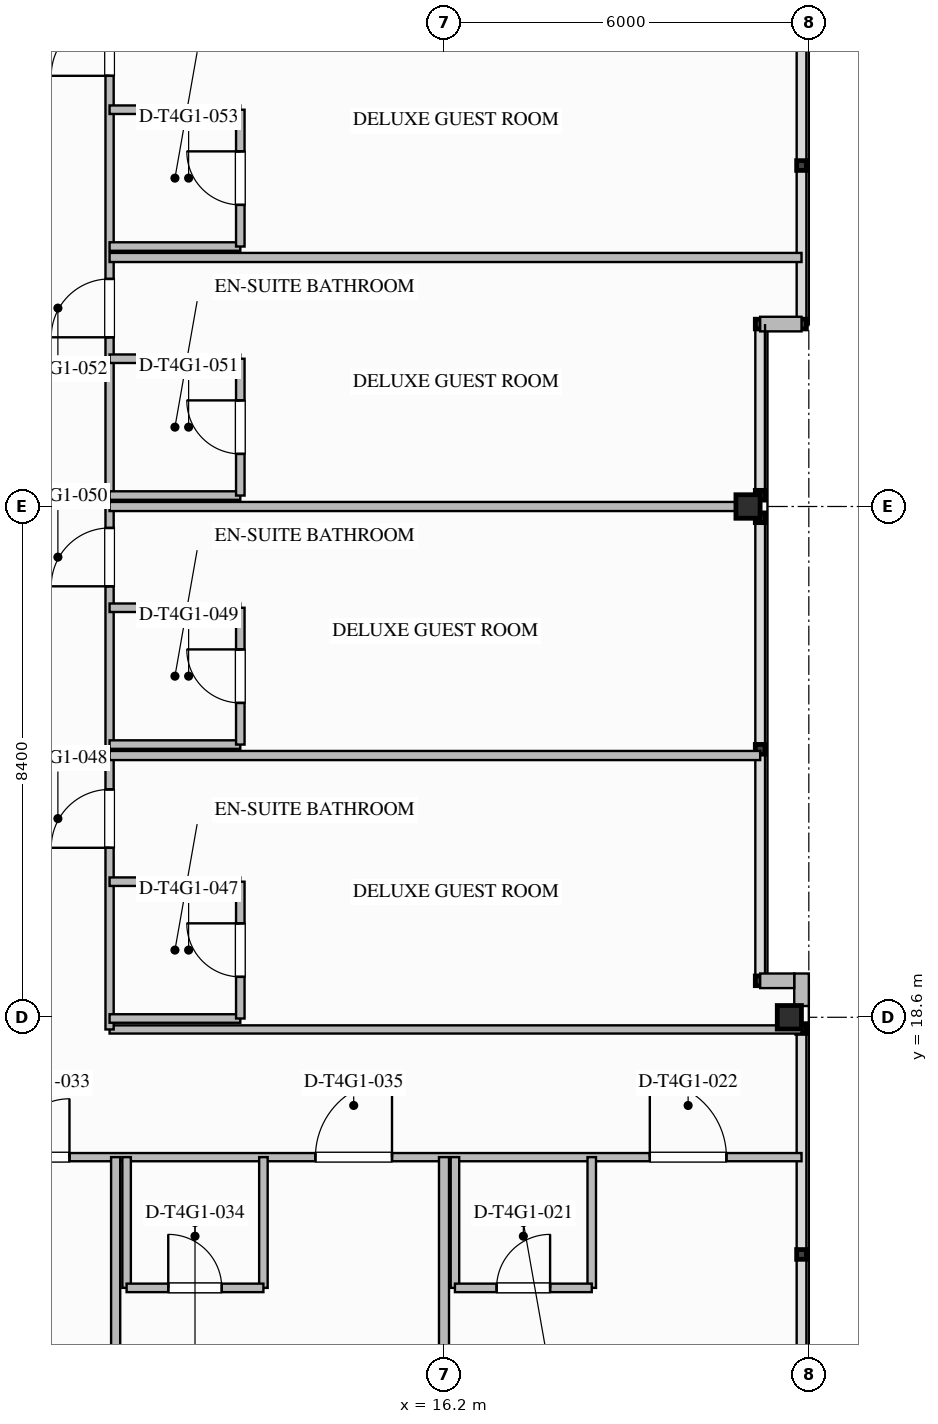
"""IFC4 building model, lengths in metres.
Left out: names, types, materials, properties, quantities, classifications, styles, units other than length and angle.
Written with IfcOpenShell. Run it as: python <this file> out.ifc"""

import sys

from ifc_helpers import new_model, si_unit, direction, frame, frame_2d, origin, origin_2d, place, context, subcontext, project, spatial, rectangle, i_section, extrude, element, fill, save


model = new_model("IFC4")
c1 = context("Model", 3, precision=1e-05, world=origin(), true_north=direction((0.0, 1.0)))
c2 = subcontext(c1, "Body", "Model", "MODEL_VIEW")
j1 = project(units=[si_unit("LENGTHUNIT", "METRE"), si_unit("PLANEANGLEUNIT", "RADIAN")], contexts=[c1])
p1 = place(None, origin())
s1 = spatial("IfcSite", under=j1, at=p1, CompositionType="ELEMENT")
p2 = place(p1, origin())
s2 = spatial("IfcBuilding", under=s1, at=p2, CompositionType="ELEMENT")
p3 = place(p2, frame((0.0, 0.0, 205.1)))
s3 = spatial("IfcBuildingStorey", under=s2, at=p3, CompositionType="ELEMENT", Elevation=205.1)
for number, where, z_axis, x_axis in (
    (1, (21.88, 18.6, 0.0), (0.0, 0.0, 1.0), (1.0, 0.0, 0.0)),
    (2, (21.2, 27.0, 0.0), (0.0, 0.0, 1.0), (1.0, 0.0, 0.0)),
):
    element("IfcColumn", number, at=place(p3, frame(where, z_axis=z_axis, x_axis=x_axis)), inside=s3, PredefinedType="COLUMN", context=c2, shape_type="SweptSolid", body=[
        extrude(i_section(OverallWidth=0.397, OverallDepth=0.387, WebThickness=0.021, FlangeThickness=0.033, FilletRadius=0.025, at=origin_2d()), origin(), (0.0, 0.0, 1.0), 3.597),
    ])
p4 = place(p3, frame((22.08, 19.32, 0.0), z_axis=(0.0, 0.0, 1.0), x_axis=(0.0, -1.0, 0.0)))
e3 = element("IfcWall", 3, at=p4, inside=s3, PredefinedType="STANDARD", context=c2, shape_type="SweptSolid", body=[
    extrude(rectangle(XDim=0.535, YDim=0.24, at=frame_2d((0.267, 0.0))), origin(), (0.0, 0.0, 1.0), 3.34),
])
p5 = place(p3, frame((22.08, 30.0, 0.0), z_axis=(0.0, 0.0, 1.0), x_axis=(-1.0, 0.0, 0.0)))
e4 = element("IfcWall", 4, at=p5, inside=s3, PredefinedType="STANDARD", context=c2, shape_type="SweptSolid", body=[
    extrude(rectangle(XDim=0.68, YDim=0.24, at=frame_2d((0.34, 0.0))), origin(), (0.0, 0.0, 1.0), 3.34),
])
p6 = place(p3, frame((21.4, 19.2, 0.0), z_axis=(0.0, 0.0, 1.0), x_axis=(1.0, 0.0, 0.0)))
e5 = element("IfcWall", 5, at=p6, inside=s3, PredefinedType="STANDARD", context=c2, shape_type="SweptSolid", body=[
    extrude(rectangle(XDim=0.56, YDim=0.24, at=frame_2d((0.28, 0.0))), origin(), (0.0, 0.0, 1.0), 3.34),
])
p7 = place(p3, frame((-16.2, 16.3, 0.0), z_axis=(0.0, 0.0, 1.0), x_axis=(1.0, 0.0, 0.0)))
e6 = element("IfcWall", 6, at=p7, inside=s3, PredefinedType="PARTITIONING", context=c2, shape_type="SweptSolid", body=[
    extrude(rectangle(XDim=38.28, YDim=0.135, at=frame_2d((19.14, 0.0))), origin(), (0.0, 0.0, 1.0), 3.34),
])
p8 = place(p7, frame((35.785, 0.0, 0.0)))
e7 = element("IfcOpeningElement", 7, at=p8, cuts=e6, PredefinedType="OPENING", context=c2, shape_type="SweptSolid", body=[
    extrude(rectangle(XDim=1.26, YDim=2.2, at=frame_2d((0.63, 1.1))), frame((0.0, 0.077, 0.0), z_axis=(0.0, -1.0, 0.0), x_axis=(1.0, 0.0, 0.0)), (0.0, 0.0, 1.0), 0.155),
])
p9 = place(p7, frame((3.285, 0.0, 0.0)))
e8 = element("IfcOpeningElement", 8, at=p9, cuts=e6, PredefinedType="OPENING", context=c2, shape_type="SweptSolid", body=[
    extrude(rectangle(XDim=1.26, YDim=2.2, at=frame_2d((0.63, 1.1))), frame((0.0, 0.077, 0.0), z_axis=(0.0, -1.0, 0.0), x_axis=(1.0, 0.0, 0.0)), (0.0, 0.0, 1.0), 0.155),
])
p10 = place(p7, frame((8.59, 0.0, 0.0)))
e9 = element("IfcOpeningElement", 9, at=p10, cuts=e6, PredefinedType="OPENING", context=c2, shape_type="SweptSolid", body=[
    extrude(rectangle(XDim=0.96, YDim=2.15, at=frame_2d((0.48, 1.075))), frame((0.0, 0.077, 0.0), z_axis=(0.0, -1.0, 0.0), x_axis=(1.0, 0.0, 0.0)), (0.0, 0.0, 1.0), 0.155),
])
p11 = place(p7, frame((12.744, 0.0, 0.0)))
e10 = element("IfcOpeningElement", 10, at=p11, cuts=e6, PredefinedType="OPENING", context=c2, shape_type="SweptSolid", body=[
    extrude(rectangle(XDim=1.02, YDim=2.15, at=frame_2d((0.51, 1.075))), frame((0.0, 0.077, 0.0), z_axis=(0.0, -1.0, 0.0), x_axis=(1.0, 0.0, 0.0)), (0.0, 0.0, 1.0), 0.155),
])
p12 = place(p7, frame((19.73, 0.0, 0.0)))
e11 = element("IfcOpeningElement", 11, at=p12, cuts=e6, PredefinedType="OPENING", context=c2, shape_type="SweptSolid", body=[
    extrude(rectangle(XDim=1.26, YDim=2.2, at=frame_2d((0.63, 1.1))), frame((0.0, 0.077, 0.0), z_axis=(0.0, -1.0, 0.0), x_axis=(1.0, 0.0, 0.0)), (0.0, 0.0, 1.0), 0.155),
])
p13 = place(p7, frame((25.281, 0.0, 0.0)))
e12 = element("IfcOpeningElement", 12, at=p13, cuts=e6, PredefinedType="OPENING", context=c2, shape_type="SweptSolid", body=[
    extrude(rectangle(XDim=0.96, YDim=2.15, at=frame_2d((0.48, 1.075))), frame((0.0, 0.077, 0.0), z_axis=(0.0, -1.0, 0.0), x_axis=(1.0, 0.0, 0.0)), (0.0, 0.0, 1.0), 0.155),
])
p14 = place(p7, frame((30.285, 0.0, 0.0)))
e13 = element("IfcOpeningElement", 13, at=p14, cuts=e6, PredefinedType="OPENING", context=c2, shape_type="SweptSolid", body=[
    extrude(rectangle(XDim=1.26, YDim=2.2, at=frame_2d((0.63, 1.1))), frame((0.0, 0.077, 0.0), z_axis=(0.0, -1.0, 0.0), x_axis=(1.0, 0.0, 0.0)), (0.0, 0.0, 1.0), 0.155),
])
p15 = place(p3, frame((10.7, 18.4, 0.0), z_axis=(0.0, 0.0, 1.0), x_axis=(1.0, 0.0, 0.0)))
e14 = element("IfcWall", 14, at=p15, inside=s3, PredefinedType="PARTITIONING", context=c2, shape_type="SweptSolid", body=[
    extrude(rectangle(XDim=11.38, YDim=0.135, at=frame_2d((5.69, 0.0))), origin(), (0.0, 0.0, 1.0), 2.717),
])
p16 = place(p3, frame((10.7, 18.4, 0.0), z_axis=(0.0, 0.0, 1.0), x_axis=(0.0, 1.0, 0.0)))
e15 = element("IfcWall", 15, at=p16, inside=s3, PredefinedType="PARTITIONING", context=c2, shape_type="SweptSolid", body=[
    extrude(rectangle(XDim=17.2, YDim=0.135, at=frame_2d((8.6, 0.0))), origin(), (0.0, 0.0, 1.0), 3.34),
])
p17 = place(p16, frame((2.987, 0.0, 0.0)))
e16 = element("IfcOpeningElement", 16, at=p17, cuts=e15, PredefinedType="OPENING", context=c2, shape_type="SweptSolid", body=[
    extrude(rectangle(XDim=0.96, YDim=2.15, at=frame_2d((0.48, 1.075))), frame((0.0, 0.077, 0.0), z_axis=(0.0, -1.0, 0.0), x_axis=(1.0, 0.0, 0.0)), (0.0, 0.0, 1.0), 0.155),
])
p18 = place(p16, frame((7.287, 0.0, 0.0)))
e17 = element("IfcOpeningElement", 17, at=p18, cuts=e15, PredefinedType="OPENING", context=c2, shape_type="SweptSolid", body=[
    extrude(rectangle(XDim=0.96, YDim=2.15, at=frame_2d((0.48, 1.075))), frame((0.0, 0.077, 0.0), z_axis=(0.0, -1.0, 0.0), x_axis=(1.0, 0.0, 0.0)), (0.0, 0.0, 1.0), 0.155),
])
p19 = place(p16, frame((11.383, 0.0, 0.0)))
e18 = element("IfcOpeningElement", 18, at=p19, cuts=e15, PredefinedType="OPENING", context=c2, shape_type="SweptSolid", body=[
    extrude(rectangle(XDim=0.96, YDim=2.15, at=frame_2d((0.48, 1.075))), frame((0.0, 0.077, 0.0), z_axis=(0.0, -1.0, 0.0), x_axis=(1.0, 0.0, 0.0)), (0.0, 0.0, 1.0), 0.155),
])
p20 = place(p16, frame((15.683, 0.0, 0.0)))
e19 = element("IfcOpeningElement", 19, at=p20, cuts=e15, PredefinedType="OPENING", context=c2, shape_type="SweptSolid", body=[
    extrude(rectangle(XDim=0.96, YDim=2.15, at=frame_2d((0.48, 1.075))), frame((0.0, 0.077, 0.0), z_axis=(0.0, -1.0, 0.0), x_axis=(1.0, 0.0, 0.0)), (0.0, 0.0, 1.0), 0.155),
])
p21 = place(p3, frame((16.2, 0.12, 0.0), z_axis=(0.0, 0.0, 1.0), x_axis=(0.0, 1.0, 0.0)))
e20 = element("IfcWall", 20, at=p21, inside=s3, PredefinedType="PARTITIONING", context=c2, shape_type="SweptSolid", body=[
    extrude(rectangle(XDim=16.18, YDim=0.165, at=frame_2d((8.09, 0.0))), origin(), (0.0, 0.0, 1.0), 2.714),
])
p22 = place(p3, frame((16.38, 16.3, 0.0), z_axis=(0.0, 0.0, 1.0), x_axis=(0.0, -1.0, 0.0)))
e21 = element("IfcWall", 21, at=p22, inside=s3, PredefinedType="PLUMBINGWALL", context=c2, shape_type="SweptSolid", body=[
    extrude(rectangle(XDim=2.15, YDim=0.14, at=frame_2d((1.075, 0.0))), origin(), (0.0, 0.0, 1.0), 2.714),
])
p23 = place(p3, frame((18.63, 16.3, 0.0), z_axis=(0.0, 0.0, 1.0), x_axis=(0.0, -1.0, 0.0)))
e22 = element("IfcWall", 22, at=p23, inside=s3, PredefinedType="PLUMBINGWALL", context=c2, shape_type="SweptSolid", body=[
    extrude(rectangle(XDim=2.15, YDim=0.14, at=frame_2d((1.075, 0.0))), origin(), (0.0, 0.0, 1.0), 3.34),
])
p24 = place(p3, frame((16.38, 14.15, 0.0), z_axis=(0.0, 0.0, 1.0), x_axis=(1.0, 0.0, 0.0)))
e23 = element("IfcWall", 23, at=p24, inside=s3, PredefinedType="PLUMBINGWALL", context=c2, shape_type="SweptSolid", body=[
    extrude(rectangle(XDim=2.25, YDim=0.14, at=frame_2d((1.125, 0.0))), origin(), (0.0, 0.0, 1.0), 3.34),
])
p25 = place(p24, frame((0.685, 0.0, 0.0)))
e24 = element("IfcOpeningElement", 24, at=p25, cuts=e23, PredefinedType="OPENING", context=c2, shape_type="SweptSolid", body=[
    extrude(rectangle(XDim=0.88, YDim=2.1, at=frame_2d((0.44, 1.05))), frame((0.0, 0.08, 0.0), z_axis=(0.0, -1.0, 0.0), x_axis=(1.0, 0.0, 0.0)), (0.0, 0.0, 1.0), 0.16),
])
p26 = place(p3, frame((10.8, 0.12, 0.0), z_axis=(0.0, 0.0, 1.0), x_axis=(0.0, 1.0, 0.0)))
e25 = element("IfcWall", 25, at=p26, inside=s3, PredefinedType="PARTITIONING", context=c2, shape_type="SweptSolid", body=[
    extrude(rectangle(XDim=16.18, YDim=0.15, at=frame_2d((8.09, 0.0))), origin(), (0.0, 0.0, 1.0), 3.34),
])
for number, where, z_axis, x_axis in (
    (26, (10.98, 16.3, 0.0), (0.0, 0.0, 1.0), (0.0, -1.0, 0.0)),
    (27, (13.23, 16.3, 0.0), (0.0, 0.0, 1.0), (0.0, -1.0, 0.0)),
):
    element("IfcWall", number, at=place(p3, frame(where, z_axis=z_axis, x_axis=x_axis)), inside=s3, PredefinedType="PLUMBINGWALL", context=c2, shape_type="SweptSolid", body=[
        extrude(rectangle(XDim=2.15, YDim=0.14, at=frame_2d((1.075, 0.0))), origin(), (0.0, 0.0, 1.0), 3.34),
    ])
p27 = place(p3, frame((10.98, 14.15, 0.0), z_axis=(0.0, 0.0, 1.0), x_axis=(1.0, 0.0, 0.0)))
e28 = element("IfcWall", 28, at=p27, inside=s3, PredefinedType="PLUMBINGWALL", context=c2, shape_type="SweptSolid", body=[
    extrude(rectangle(XDim=2.25, YDim=0.14, at=frame_2d((1.125, 0.0))), origin(), (0.0, 0.0, 1.0), 3.34),
])
p28 = place(p27, frame((0.685, 0.0, 0.0)))
e29 = element("IfcOpeningElement", 29, at=p28, cuts=e28, PredefinedType="OPENING", context=c2, shape_type="SweptSolid", body=[
    extrude(rectangle(XDim=0.88, YDim=2.1, at=frame_2d((0.44, 1.05))), frame((0.0, 0.08, 0.0), z_axis=(0.0, -1.0, 0.0), x_axis=(1.0, 0.0, 0.0)), (0.0, 0.0, 1.0), 0.16),
])
p29 = place(p3, frame((10.7, 18.58, 0.0), z_axis=(0.0, 0.0, 1.0), x_axis=(1.0, 0.0, 0.0)))
e30 = element("IfcWall", 30, at=p29, inside=s3, PredefinedType="PLUMBINGWALL", context=c2, shape_type="SweptSolid", body=[
    extrude(rectangle(XDim=2.15, YDim=0.14, at=frame_2d((1.075, 0.0))), origin(), (0.0, 0.0, 1.0), 2.717),
])
p30 = place(p3, frame((10.7, 20.83, 0.0), z_axis=(0.0, 0.0, 1.0), x_axis=(1.0, 0.0, 0.0)))
e31 = element("IfcWall", 31, at=p30, inside=s3, PredefinedType="PLUMBINGWALL", context=c2, shape_type="SweptSolid", body=[
    extrude(rectangle(XDim=2.15, YDim=0.14, at=frame_2d((1.075, 0.0))), origin(), (0.0, 0.0, 1.0), 3.34),
])
p31 = place(p3, frame((12.85, 18.58, 0.0), z_axis=(0.0, 0.0, 1.0), x_axis=(0.0, 1.0, 0.0)))
e32 = element("IfcWall", 32, at=p31, inside=s3, PredefinedType="PLUMBINGWALL", context=c2, shape_type="SweptSolid", body=[
    extrude(rectangle(XDim=2.25, YDim=0.14, at=frame_2d((1.125, 0.0))), origin(), (0.0, 0.0, 1.0), 3.34),
])
p32 = place(p31, frame((0.685, 0.0, 0.0)))
e33 = element("IfcOpeningElement", 33, at=p32, cuts=e32, PredefinedType="OPENING", context=c2, shape_type="SweptSolid", body=[
    extrude(rectangle(XDim=0.88, YDim=2.1, at=frame_2d((0.44, 1.05))), frame((0.0, 0.08, 0.0), z_axis=(0.0, -1.0, 0.0), x_axis=(1.0, 0.0, 0.0)), (0.0, 0.0, 1.0), 0.16),
])
p33 = place(p3, frame((10.7, 22.905, 0.0), z_axis=(0.0, 0.0, 1.0), x_axis=(1.0, 0.0, 0.0)))
e34 = element("IfcWall", 34, at=p33, inside=s3, PredefinedType="PARTITIONING", context=c2, shape_type="SweptSolid", body=[
    extrude(rectangle(XDim=10.7, YDim=0.15, at=frame_2d((5.35, 0.0))), origin(), (0.0, 0.0, 1.0), 3.34),
])
for number, where, z_axis, x_axis in (
    (35, (10.7, 23.085, 0.0), (0.0, 0.0, 1.0), (1.0, 0.0, 0.0)),
    (36, (10.7, 25.335, 0.0), (0.0, 0.0, 1.0), (1.0, 0.0, 0.0)),
):
    element("IfcWall", number, at=place(p3, frame(where, z_axis=z_axis, x_axis=x_axis)), inside=s3, PredefinedType="PLUMBINGWALL", context=c2, shape_type="SweptSolid", body=[
        extrude(rectangle(XDim=2.15, YDim=0.14, at=frame_2d((1.075, 0.0))), origin(), (0.0, 0.0, 1.0), 3.34),
    ])
p34 = place(p3, frame((12.85, 23.085, 0.0), z_axis=(0.0, 0.0, 1.0), x_axis=(0.0, 1.0, 0.0)))
e37 = element("IfcWall", 37, at=p34, inside=s3, PredefinedType="PLUMBINGWALL", context=c2, shape_type="SweptSolid", body=[
    extrude(rectangle(XDim=2.25, YDim=0.14, at=frame_2d((1.125, 0.0))), origin(), (0.0, 0.0, 1.0), 3.34),
])
p35 = place(p34, frame((0.685, 0.0, 0.0)))
e38 = element("IfcOpeningElement", 38, at=p35, cuts=e37, PredefinedType="OPENING", context=c2, shape_type="SweptSolid", body=[
    extrude(rectangle(XDim=0.88, YDim=2.1, at=frame_2d((0.44, 1.05))), frame((0.0, 0.08, 0.0), z_axis=(0.0, -1.0, 0.0), x_axis=(1.0, 0.0, 0.0)), (0.0, 0.0, 1.0), 0.16),
])
p36 = place(p3, frame((10.7, 27.0, 0.0), z_axis=(0.0, 0.0, 1.0), x_axis=(1.0, 0.0, 0.0)))
e39 = element("IfcWall", 39, at=p36, inside=s3, PredefinedType="PARTITIONING", context=c2, shape_type="SweptSolid", body=[
    extrude(rectangle(XDim=10.7, YDim=0.15, at=frame_2d((5.35, 0.0))), origin(), (0.0, 0.0, 1.0), 2.717),
])
p37 = place(p3, frame((10.7, 27.18, 0.0), z_axis=(0.0, 0.0, 1.0), x_axis=(1.0, 0.0, 0.0)))
e40 = element("IfcWall", 40, at=p37, inside=s3, PredefinedType="PLUMBINGWALL", context=c2, shape_type="SweptSolid", body=[
    extrude(rectangle(XDim=2.15, YDim=0.14, at=frame_2d((1.075, 0.0))), origin(), (0.0, 0.0, 1.0), 2.717),
])
p38 = place(p3, frame((10.7, 29.43, 0.0), z_axis=(0.0, 0.0, 1.0), x_axis=(1.0, 0.0, 0.0)))
e41 = element("IfcWall", 41, at=p38, inside=s3, PredefinedType="PLUMBINGWALL", context=c2, shape_type="SweptSolid", body=[
    extrude(rectangle(XDim=2.15, YDim=0.14, at=frame_2d((1.075, 0.0))), origin(), (0.0, 0.0, 1.0), 3.34),
])
p39 = place(p3, frame((12.85, 27.18, 0.0), z_axis=(0.0, 0.0, 1.0), x_axis=(0.0, 1.0, 0.0)))
e42 = element("IfcWall", 42, at=p39, inside=s3, PredefinedType="PLUMBINGWALL", context=c2, shape_type="SweptSolid", body=[
    extrude(rectangle(XDim=2.25, YDim=0.14, at=frame_2d((1.125, 0.0))), origin(), (0.0, 0.0, 1.0), 3.34),
])
p40 = place(p39, frame((0.685, 0.0, 0.0)))
e43 = element("IfcOpeningElement", 43, at=p40, cuts=e42, PredefinedType="OPENING", context=c2, shape_type="SweptSolid", body=[
    extrude(rectangle(XDim=0.88, YDim=2.1, at=frame_2d((0.44, 1.05))), frame((0.0, 0.08, 0.0), z_axis=(0.0, -1.0, 0.0), x_axis=(1.0, 0.0, 0.0)), (0.0, 0.0, 1.0), 0.16),
])
p41 = place(p3, frame((10.7, 31.095, 0.0), z_axis=(0.0, 0.0, 1.0), x_axis=(1.0, 0.0, 0.0)))
e44 = element("IfcWall", 44, at=p41, inside=s3, PredefinedType="PARTITIONING", context=c2, shape_type="SweptSolid", body=[
    extrude(rectangle(XDim=11.38, YDim=0.15, at=frame_2d((5.69, 0.0))), origin(), (0.0, 0.0, 1.0), 3.34),
])
for number, where, z_axis, x_axis in (
    (45, (10.7, 31.275, 0.0), (0.0, 0.0, 1.0), (1.0, 0.0, 0.0)),
    (46, (10.7, 33.525, 0.0), (0.0, 0.0, 1.0), (1.0, 0.0, 0.0)),
):
    element("IfcWall", number, at=place(p3, frame(where, z_axis=z_axis, x_axis=x_axis)), inside=s3, PredefinedType="PLUMBINGWALL", context=c2, shape_type="SweptSolid", body=[
        extrude(rectangle(XDim=2.15, YDim=0.14, at=frame_2d((1.075, 0.0))), origin(), (0.0, 0.0, 1.0), 3.34),
    ])
p42 = place(p3, frame((12.85, 31.275, 0.0), z_axis=(0.0, 0.0, 1.0), x_axis=(0.0, 1.0, 0.0)))
e47 = element("IfcWall", 47, at=p42, inside=s3, PredefinedType="PLUMBINGWALL", context=c2, shape_type="SweptSolid", body=[
    extrude(rectangle(XDim=2.25, YDim=0.14, at=frame_2d((1.125, 0.0))), origin(), (0.0, 0.0, 1.0), 3.34),
])
p43 = place(p42, frame((0.685, 0.0, 0.0)))
e48 = element("IfcOpeningElement", 48, at=p43, cuts=e47, PredefinedType="OPENING", context=c2, shape_type="SweptSolid", body=[
    extrude(rectangle(XDim=0.88, YDim=2.1, at=frame_2d((0.44, 1.05))), frame((0.0, 0.08, 0.0), z_axis=(0.0, -1.0, 0.0), x_axis=(1.0, 0.0, 0.0)), (0.0, 0.0, 1.0), 0.16),
])
p44 = place(p25, origin())
e49 = element("IfcDoor", 49, at=p44, inside=s3, OperationType="SINGLE_SWING_RIGHT", PredefinedType="DOOR", context=c2, shape_type="SweptSolid", body=[
    extrude(rectangle(XDim=0.88, YDim=2.1, at=frame_2d((0.44, 1.05))), frame((0.0, 0.025, 0.0), z_axis=(0.0, -1.0, 0.0), x_axis=(1.0, 0.0, 0.0)), (0.0, 0.0, 1.0), 0.05),
])
fill(e24, e49)
p45 = place(p8, origin())
e50 = element("IfcDoor", 50, at=p45, inside=s3, OperationType="SINGLE_SWING_LEFT", PredefinedType="DOOR", context=c2, shape_type="SweptSolid", body=[
    extrude(rectangle(XDim=1.26, YDim=2.2, at=frame_2d((0.63, 1.1))), frame((0.0, 0.025, 0.0), z_axis=(0.0, -1.0, 0.0), x_axis=(1.0, 0.0, 0.0)), (0.0, 0.0, 1.0), 0.05),
])
fill(e7, e50)
p46 = place(p13, origin())
e51 = element("IfcDoor", 51, at=p46, inside=s3, OperationType="SINGLE_SWING_RIGHT", PredefinedType="DOOR", context=c2, shape_type="SweptSolid", body=[
    extrude(rectangle(XDim=0.96, YDim=2.15, at=frame_2d((0.48, 1.075))), frame((0.0, 0.025, 0.0), z_axis=(0.0, -1.0, 0.0), x_axis=(1.0, 0.0, 0.0)), (0.0, 0.0, 1.0), 0.05),
])
fill(e12, e51)
p47 = place(p28, origin())
e52 = element("IfcDoor", 52, at=p47, inside=s3, OperationType="SINGLE_SWING_LEFT", PredefinedType="DOOR", context=c2, shape_type="SweptSolid", body=[
    extrude(rectangle(XDim=0.88, YDim=2.1, at=frame_2d((0.44, 1.05))), frame((0.0, 0.025, 0.0), z_axis=(0.0, -1.0, 0.0), x_axis=(1.0, 0.0, 0.0)), (0.0, 0.0, 1.0), 0.05),
])
fill(e29, e52)
p48 = place(p14, origin())
e53 = element("IfcDoor", 53, at=p48, inside=s3, OperationType="SINGLE_SWING_RIGHT", PredefinedType="DOOR", context=c2, shape_type="SweptSolid", body=[
    extrude(rectangle(XDim=1.26, YDim=2.2, at=frame_2d((0.63, 1.1))), frame((0.0, 0.025, 0.0), z_axis=(0.0, -1.0, 0.0), x_axis=(1.0, 0.0, 0.0)), (0.0, 0.0, 1.0), 0.05),
])
fill(e13, e53)
p49 = place(p32, origin())
e54 = element("IfcDoor", 54, at=p49, inside=s3, OperationType="SINGLE_SWING_RIGHT", PredefinedType="DOOR", context=c2, shape_type="SweptSolid", body=[
    extrude(rectangle(XDim=0.88, YDim=2.1, at=frame_2d((0.44, 1.05))), frame((0.0, 0.025, 0.0), z_axis=(0.0, -1.0, 0.0), x_axis=(1.0, 0.0, 0.0)), (0.0, 0.0, 1.0), 0.05),
])
fill(e33, e54)
p50 = place(p17, origin())
e55 = element("IfcDoor", 55, at=p50, inside=s3, OperationType="SINGLE_SWING_LEFT", PredefinedType="DOOR", context=c2, shape_type="SweptSolid", body=[
    extrude(rectangle(XDim=0.96, YDim=2.15, at=frame_2d((0.48, 1.075))), frame((0.0, 0.025, 0.0), z_axis=(0.0, -1.0, 0.0), x_axis=(1.0, 0.0, 0.0)), (0.0, 0.0, 1.0), 0.05),
])
fill(e16, e55)
p51 = place(p35, origin())
e56 = element("IfcDoor", 56, at=p51, inside=s3, OperationType="SINGLE_SWING_RIGHT", PredefinedType="DOOR", context=c2, shape_type="SweptSolid", body=[
    extrude(rectangle(XDim=0.88, YDim=2.1, at=frame_2d((0.44, 1.05))), frame((0.0, 0.025, 0.0), z_axis=(0.0, -1.0, 0.0), x_axis=(1.0, 0.0, 0.0)), (0.0, 0.0, 1.0), 0.05),
])
fill(e38, e56)
p52 = place(p18, origin())
e57 = element("IfcDoor", 57, at=p52, inside=s3, OperationType="SINGLE_SWING_LEFT", PredefinedType="DOOR", context=c2, shape_type="SweptSolid", body=[
    extrude(rectangle(XDim=0.96, YDim=2.15, at=frame_2d((0.48, 1.075))), frame((0.0, 0.025, 0.0), z_axis=(0.0, -1.0, 0.0), x_axis=(1.0, 0.0, 0.0)), (0.0, 0.0, 1.0), 0.05),
])
fill(e17, e57)
p53 = place(p40, origin())
e58 = element("IfcDoor", 58, at=p53, inside=s3, OperationType="SINGLE_SWING_RIGHT", PredefinedType="DOOR", context=c2, shape_type="SweptSolid", body=[
    extrude(rectangle(XDim=0.88, YDim=2.1, at=frame_2d((0.44, 1.05))), frame((0.0, 0.025, 0.0), z_axis=(0.0, -1.0, 0.0), x_axis=(1.0, 0.0, 0.0)), (0.0, 0.0, 1.0), 0.05),
])
fill(e43, e58)
p54 = place(p19, origin())
e59 = element("IfcDoor", 59, at=p54, inside=s3, OperationType="SINGLE_SWING_LEFT", PredefinedType="DOOR", context=c2, shape_type="SweptSolid", body=[
    extrude(rectangle(XDim=0.96, YDim=2.15, at=frame_2d((0.48, 1.075))), frame((0.0, 0.025, 0.0), z_axis=(0.0, -1.0, 0.0), x_axis=(1.0, 0.0, 0.0)), (0.0, 0.0, 1.0), 0.05),
])
fill(e18, e59)
p55 = place(p43, origin())
e60 = element("IfcDoor", 60, at=p55, inside=s3, OperationType="SINGLE_SWING_RIGHT", PredefinedType="DOOR", context=c2, shape_type="SweptSolid", body=[
    extrude(rectangle(XDim=0.88, YDim=2.1, at=frame_2d((0.44, 1.05))), frame((0.0, 0.025, 0.0), z_axis=(0.0, -1.0, 0.0), x_axis=(1.0, 0.0, 0.0)), (0.0, 0.0, 1.0), 0.05),
])
fill(e48, e60)
p56 = place(p20, origin())
e61 = element("IfcDoor", 61, at=p56, inside=s3, OperationType="SINGLE_SWING_LEFT", PredefinedType="DOOR", context=c2, shape_type="SweptSolid", body=[
    extrude(rectangle(XDim=0.96, YDim=2.15, at=frame_2d((0.48, 1.075))), frame((0.0, 0.025, 0.0), z_axis=(0.0, -1.0, 0.0), x_axis=(1.0, 0.0, 0.0)), (0.0, 0.0, 1.0), 0.05),
])
fill(e19, e61)
save(model, sys.argv[1])
